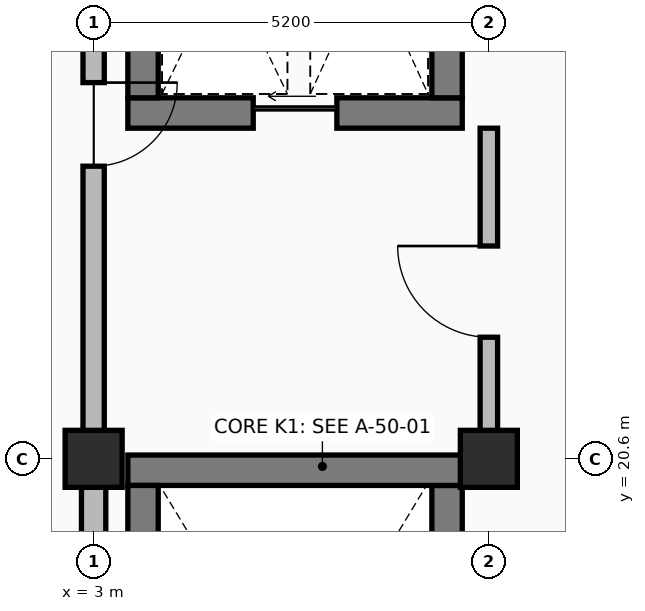
"""IFC4 building model, lengths in metres.
Left out: names, types, materials, properties, quantities, classifications, styles, units other than length and angle.
Written with IfcOpenShell. Run it as: python <this file> out.ifc"""

import sys

from ifc_helpers import new_model, si_unit, direction, frame, frame_2d, origin, origin_2d, place, context, subcontext, project, spatial, rectangle, extrude, element, fill, save


model = new_model("IFC4")
c1 = context("Model", 3, precision=1e-05, world=origin(), true_north=direction((0.0, 1.0)))
c2 = subcontext(c1, "Body", "Model", "MODEL_VIEW")
j1 = project(units=[si_unit("LENGTHUNIT", "METRE"), si_unit("PLANEANGLEUNIT", "RADIAN")], contexts=[c1])
p1 = place(None, origin())
s1 = spatial("IfcSite", under=j1, at=p1, CompositionType="ELEMENT")
p2 = place(p1, origin())
s2 = spatial("IfcBuilding", under=s1, at=p2, CompositionType="ELEMENT")
p3 = place(p2, origin())
s3 = spatial("IfcBuildingStorey", under=s2, at=p3, CompositionType="ELEMENT", Elevation=0.0)
for number, where, z_axis, x_axis in (
    (1, (3.0, 20.6, 0.0), (0.0, 0.0, 1.0), (1.0, 0.0, 0.0)),
    (2, (8.2, 20.6, 0.0), (0.0, 0.0, 1.0), (1.0, 0.0, 0.0)),
):
    element("IfcColumn", number, at=place(p3, frame(where, z_axis=z_axis, x_axis=x_axis)), inside=s3, PredefinedType="COLUMN", context=c2, shape_type="SweptSolid", body=[
        extrude(rectangle(XDim=0.75, YDim=0.75, at=origin_2d()), origin(), (0.0, 0.0, 1.0), 4.8),
    ])
p4 = place(p3, frame((3.0, 20.23, 0.0), z_axis=(0.0, 0.0, 1.0), x_axis=(0.0, -1.0, 0.0)))
e3 = element("IfcWall", 3, at=p4, inside=s3, PredefinedType="SOLIDWALL", context=c2, shape_type="SweptSolid", body=[
    extrude(rectangle(XDim=3.81, YDim=0.32, at=frame_2d((1.905, 0.0))), origin(), (0.0, 0.0, 1.0), 3.685),
])
p5 = place(p4, frame((0.805, 0.0, 0.9)))
e4 = element("IfcOpeningElement", 4, at=p5, cuts=e3, PredefinedType="OPENING", context=c2, shape_type="SweptSolid", body=[
    extrude(rectangle(XDim=2.2, YDim=1.4, at=frame_2d((1.1, 0.7))), frame((0.0, 0.17, 0.0), z_axis=(0.0, -1.0, 0.0), x_axis=(1.0, 0.0, 0.0)), (0.0, 0.0, 1.0), 0.34),
])
p6 = place(p3, frame((3.0, 29.03, 0.0), z_axis=(0.0, 0.0, 1.0), x_axis=(0.0, -1.0, 0.0)))
e5 = element("IfcWall", 5, at=p6, inside=s3, PredefinedType="SOLIDWALL", context=c2, shape_type="SweptSolid", body=[
    extrude(rectangle(XDim=8.06, YDim=0.28, at=frame_2d((4.03, 0.0))), origin(), (0.0, 0.0, 1.0), 3.685),
])
p7 = place(p6, frame((3.48, 0.0, 0.0)))
e6 = element("IfcOpeningElement", 6, at=p7, cuts=e5, PredefinedType="OPENING", context=c2, shape_type="SweptSolid", body=[
    extrude(rectangle(XDim=1.1, YDim=2.2, at=frame_2d((0.55, 1.1))), frame((0.0, 0.15, 0.0), z_axis=(0.0, -1.0, 0.0), x_axis=(1.0, 0.0, 0.0)), (0.0, 0.0, 1.0), 0.3),
])
p8 = place(p3, frame((7.65, 12.6, 0.0), z_axis=(0.0, 0.0, 1.0), x_axis=(0.0, 1.0, 0.0)))
e7 = element("IfcWall", 7, at=p8, inside=s3, PredefinedType="SHEAR", context=c2, shape_type="SweptSolid", body=[
    extrude(rectangle(XDim=7.65, YDim=0.4, at=frame_2d((3.825, 0.0))), origin(), (0.0, 0.0, 1.0), 4.49),
])
p9 = place(p8, frame((0.4, 0.0, 0.0)))
e8 = element("IfcOpeningElement", 8, at=p9, cuts=e7, PredefinedType="OPENING", context=c2, shape_type="SweptSolid", body=[
    extrude(rectangle(XDim=1.1, YDim=2.2, at=frame_2d((0.55, 1.1))), frame((0.0, 0.21, 0.0), z_axis=(0.0, -1.0, 0.0), x_axis=(1.0, 0.0, 0.0)), (0.0, 0.0, 1.0), 0.42),
])
p10 = place(p3, frame((7.85, 20.45, 0.0), z_axis=(0.0, 0.0, 1.0), x_axis=(-1.0, 0.0, 0.0)))
e9 = element("IfcWall", 9, at=p10, inside=s3, PredefinedType="SHEAR", context=c2, shape_type="SweptSolid", body=[
    extrude(rectangle(XDim=4.4, YDim=0.4, at=frame_2d((2.2, 0.0))), origin(), (0.0, 0.0, 1.0), 4.49),
])
p11 = place(p3, frame((3.65, 20.25, 0.0), z_axis=(0.0, 0.0, 1.0), x_axis=(0.0, -1.0, 0.0)))
e10 = element("IfcWall", 10, at=p11, inside=s3, PredefinedType="SHEAR", context=c2, shape_type="SweptSolid", body=[
    extrude(rectangle(XDim=7.65, YDim=0.4, at=frame_2d((3.825, 0.0))), origin(), (0.0, 0.0, 1.0), 4.49),
])
p12 = place(p3, frame((3.45, 25.15, 0.0), z_axis=(0.0, 0.0, 1.0), x_axis=(1.0, 0.0, 0.0)))
e11 = element("IfcWall", 11, at=p12, inside=s3, PredefinedType="SHEAR", context=c2, shape_type="SweptSolid", body=[
    extrude(rectangle(XDim=4.4, YDim=0.4, at=frame_2d((2.2, 0.0))), origin(), (0.0, 0.0, 1.0), 4.49),
])
p13 = place(p12, frame((1.65, 0.0, 0.0)))
e12 = element("IfcOpeningElement", 12, at=p13, cuts=e11, PredefinedType="OPENING", context=c2, shape_type="SweptSolid", body=[
    extrude(rectangle(XDim=1.1, YDim=2.2, at=frame_2d((0.55, 1.1))), frame((0.0, 0.21, 0.0), z_axis=(0.0, -1.0, 0.0), x_axis=(1.0, 0.0, 0.0)), (0.0, 0.0, 1.0), 0.42),
])
for number, where, z_axis, x_axis in (
    (13, (7.65, 25.35, 0.0), (0.0, 0.0, 1.0), (0.0, 1.0, 0.0)),
    (14, (3.65, 28.85, 0.0), (0.0, 0.0, 1.0), (0.0, -1.0, 0.0)),
):
    element("IfcWall", number, at=place(p3, frame(where, z_axis=z_axis, x_axis=x_axis)), inside=s3, PredefinedType="SHEAR", context=c2, shape_type="SweptSolid", body=[
        extrude(rectangle(XDim=3.5, YDim=0.4, at=frame_2d((1.75, 0.0))), origin(), (0.0, 0.0, 1.0), 4.49),
    ])
p14 = place(p3, frame((8.2, 20.65, 0.0), z_axis=(0.0, 0.0, 1.0), x_axis=(0.0, 1.0, 0.0)))
e15 = element("IfcWall", 15, at=p14, inside=s3, PredefinedType="PARTITIONING", context=c2, shape_type="SweptSolid", body=[
    extrude(rectangle(XDim=4.3, YDim=0.23, at=frame_2d((2.15, 0.0))), origin(), (0.0, 0.0, 1.0), 3.575),
])
p15 = place(p14, frame((1.55, 0.0, 0.0)))
e16 = element("IfcOpeningElement", 16, at=p15, cuts=e15, PredefinedType="OPENING", context=c2, shape_type="SweptSolid", body=[
    extrude(rectangle(XDim=1.2, YDim=2.2, at=frame_2d((0.6, 1.1))), frame((0.0, 0.125, 0.0), z_axis=(0.0, -1.0, 0.0), x_axis=(1.0, 0.0, 0.0)), (0.0, 0.0, 1.0), 0.25),
])
p16 = place(p7, origin())
e17 = element("IfcDoor", 17, at=p16, inside=s3, OperationType="SINGLE_SWING_LEFT", PredefinedType="DOOR", context=c2, shape_type="SweptSolid", body=[
    extrude(rectangle(XDim=1.1, YDim=2.2, at=frame_2d((0.55, 1.1))), frame((0.0, 0.025, 0.0), z_axis=(0.0, -1.0, 0.0), x_axis=(1.0, 0.0, 0.0)), (0.0, 0.0, 1.0), 0.05),
])
fill(e6, e17)
p17 = place(p13, origin())
e18 = element("IfcDoor", 18, at=p17, inside=s3, OperationType="SLIDING_TO_LEFT", PredefinedType="DOOR", context=c2, shape_type="SweptSolid", body=[
    extrude(rectangle(XDim=1.1, YDim=2.2, at=frame_2d((0.55, 1.1))), frame((0.0, 0.025, 0.0), z_axis=(0.0, -1.0, 0.0), x_axis=(1.0, 0.0, 0.0)), (0.0, 0.0, 1.0), 0.05),
])
fill(e12, e18)
p18 = place(p15, origin())
e19 = element("IfcDoor", 19, at=p18, inside=s3, OperationType="SINGLE_SWING_RIGHT", PredefinedType="DOOR", context=c2, shape_type="SweptSolid", body=[
    extrude(rectangle(XDim=1.2, YDim=2.2, at=frame_2d((0.6, 1.1))), frame((0.0, 0.025, 0.0), z_axis=(0.0, -1.0, 0.0), x_axis=(1.0, 0.0, 0.0)), (0.0, 0.0, 1.0), 0.05),
])
fill(e16, e19)
save(model, sys.argv[1])
